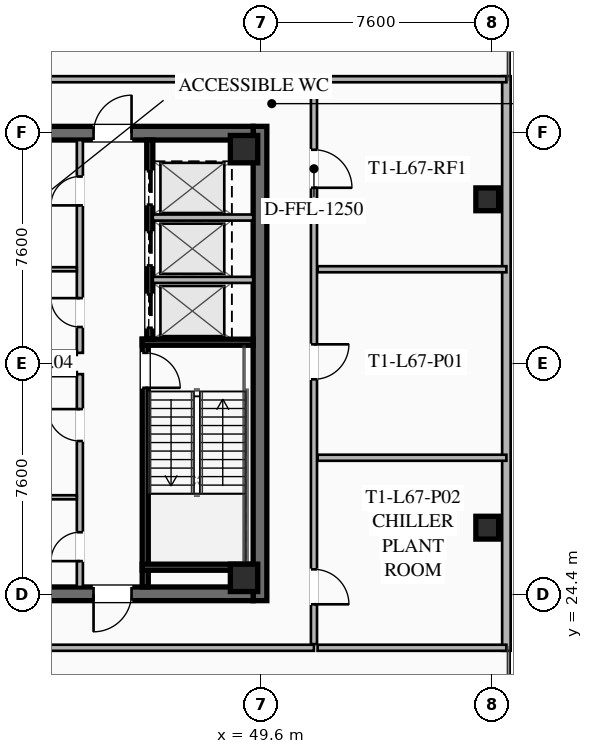
"""IFC4 building model, lengths in metres.
Left out: names, types, materials, properties, quantities, classifications, styles, units other than length and angle.
Written with IfcOpenShell. Run it as: python <this file> out.ifc"""

import sys

from ifc_helpers import new_model, si_unit, direction, frame, frame_2d, origin, origin_2d, place, context, subcontext, project, spatial, rectangle, hollow_rectangle, extrude, element, fill, save


model = new_model("IFC4")
c1 = context("Model", 3, precision=1e-05, world=origin(), true_north=direction((0.0, 1.0)))
c2 = subcontext(c1, "Body", "Model", "MODEL_VIEW")
j1 = project(units=[si_unit("LENGTHUNIT", "METRE"), si_unit("PLANEANGLEUNIT", "RADIAN")], contexts=[c1])
p1 = place(None, origin())
s1 = spatial("IfcSite", under=j1, at=p1, CompositionType="ELEMENT")
p2 = place(p1, origin())
s2 = spatial("IfcBuilding", under=s1, at=p2, CompositionType="ELEMENT")
p3 = place(p2, frame((0.0, 0.0, 246.8)))
s3 = spatial("IfcBuildingStorey", under=s2, at=p3, CompositionType="ELEMENT", Elevation=246.8)
p4 = place(p3, frame((49.575, 39.8, 0.0), z_axis=(0.0, 0.0, 1.0), x_axis=(0.0, -1.0, 0.0)))
e1 = element("IfcWall", 1, at=p4, inside=s3, PredefinedType="SHEAR", context=c2, shape_type="SweptSolid", body=[
    extrude(rectangle(XDim=15.6, YDim=0.45, at=frame_2d((7.8, 0.0))), origin(), (0.0, 0.0, 1.0), 4.6),
])
p5 = place(p3, frame((49.35, 24.425, 0.0), z_axis=(0.0, 0.0, 1.0), x_axis=(-1.0, 0.0, 0.0)))
e2 = element("IfcWall", 2, at=p5, inside=s3, PredefinedType="SHEAR", context=c2, shape_type="SweptSolid", body=[
    extrude(rectangle(XDim=14.7, YDim=0.45, at=frame_2d((7.35, 0.0))), origin(), (0.0, 0.0, 1.0), 4.6),
])
p6 = place(p5, frame((9.05, 0.0, 0.0)))
e3 = element("IfcOpeningElement", 3, at=p6, cuts=e2, PredefinedType="OPENING", context=c2, shape_type="SweptSolid", body=[
    extrude(rectangle(XDim=1.25, YDim=2.25, at=frame_2d((0.625, 1.125))), frame((0.0, 0.235, 0.0), z_axis=(0.0, -1.0, 0.0), x_axis=(1.0, 0.0, 0.0)), (0.0, 0.0, 1.0), 0.47),
])
p7 = place(p5, frame((4.0, 0.0, 0.0)))
e4 = element("IfcOpeningElement", 4, at=p7, cuts=e2, PredefinedType="OPENING", context=c2, shape_type="SweptSolid", body=[
    extrude(rectangle(XDim=1.25, YDim=2.25, at=frame_2d((0.625, 1.125))), frame((0.0, 0.235, 0.0), z_axis=(0.0, -1.0, 0.0), x_axis=(1.0, 0.0, 0.0)), (0.0, 0.0, 1.0), 0.47),
])
p8 = place(p3, frame((34.65, 39.575, 0.0), z_axis=(0.0, 0.0, 1.0), x_axis=(1.0, 0.0, 0.0)))
e5 = element("IfcWall", 5, at=p8, inside=s3, PredefinedType="SHEAR", context=c2, shape_type="SweptSolid", body=[
    extrude(rectangle(XDim=14.7, YDim=0.45, at=frame_2d((7.35, 0.0))), origin(), (0.0, 0.0, 1.0), 4.6),
])
p9 = place(p8, frame((4.4, 0.0, 0.0)))
e6 = element("IfcOpeningElement", 6, at=p9, cuts=e5, PredefinedType="OPENING", context=c2, shape_type="SweptSolid", body=[
    extrude(rectangle(XDim=1.25, YDim=2.25, at=frame_2d((0.625, 1.125))), frame((0.0, 0.235, 0.0), z_axis=(0.0, -1.0, 0.0), x_axis=(1.0, 0.0, 0.0)), (0.0, 0.0, 1.0), 0.47),
])
p10 = place(p8, frame((9.45, 0.0, 0.0)))
e7 = element("IfcOpeningElement", 7, at=p10, cuts=e5, PredefinedType="OPENING", context=c2, shape_type="SweptSolid", body=[
    extrude(rectangle(XDim=1.25, YDim=2.25, at=frame_2d((0.625, 1.125))), frame((0.0, 0.235, 0.0), z_axis=(0.0, -1.0, 0.0), x_axis=(1.0, 0.0, 0.0)), (0.0, 0.0, 1.0), 0.47),
])
for number, where, z_axis, x_axis in (
    (8, (49.05, 24.95, 0.0), (0.0, 0.0, 1.0), (1.0, 0.0, 0.0)),
    (9, (49.05, 39.05, 0.0), (0.0, 0.0, 1.0), (1.0, 0.0, 0.0)),
):
    element("IfcColumn", number, at=place(p3, frame(where, z_axis=z_axis, x_axis=x_axis)), inside=s3, PredefinedType="COLUMN", context=c2, shape_type="SweptSolid", body=[
        extrude(hollow_rectangle(XDim=0.9, YDim=0.9, WallThickness=0.04, at=origin_2d()), origin(), (0.0, 0.0, 1.0), 4.38),
    ])
for number, where, z_axis, x_axis in (
    (10, (57.05, 26.6, 0.0), (0.0, 0.0, 1.0), (1.0, 0.0, 0.0)),
    (11, (57.05, 37.4, 0.0), (0.0, 0.0, 1.0), (1.0, 0.0, 0.0)),
):
    element("IfcColumn", number, at=place(p3, frame(where, z_axis=z_axis, x_axis=x_axis)), inside=s3, PredefinedType="COLUMN", context=c2, shape_type="SweptSolid", body=[
        extrude(hollow_rectangle(XDim=0.75, YDim=0.75, WallThickness=0.032, at=origin_2d()), origin(), (0.0, 0.0, 1.0), 4.38),
    ])
p11 = place(p3, frame((57.68, 41.45, 0.0), z_axis=(0.0, 0.0, 1.0), x_axis=(0.0, -1.0, 0.0)))
e12 = element("IfcWall", 12, at=p11, inside=s3, PredefinedType="SOLIDWALL", context=c2, shape_type="SweptSolid", body=[
    extrude(rectangle(XDim=18.9, YDim=0.28, at=frame_2d((9.45, 0.0))), origin(), (0.0, 0.0, 1.0), 4.38),
])
p12 = place(p3, frame((45.8, 32.8, 0.0), z_axis=(0.0, 0.0, 1.0), x_axis=(0.0, -1.0, 0.0)))
e13 = element("IfcWall", 13, at=p12, inside=s3, PredefinedType="SHEAR", context=c2, shape_type="SweptSolid", body=[
    extrude(rectangle(XDim=8.15, YDim=0.2, at=frame_2d((4.075, 0.0))), origin(), (0.0, 0.0, 1.0), 4.38),
])
p13 = place(p12, frame((0.45, 0.0, 0.0)))
e14 = element("IfcOpeningElement", 14, at=p13, cuts=e13, PredefinedType="OPENING", context=c2, shape_type="SweptSolid", body=[
    extrude(rectangle(XDim=1.15, YDim=2.2, at=frame_2d((0.575, 1.1))), frame((0.0, 0.11, 0.0), z_axis=(0.0, -1.0, 0.0), x_axis=(1.0, 0.0, 0.0)), (0.0, 0.0, 1.0), 0.22),
])
for number, where, z_axis, x_axis in (
    (15, (45.7, 32.7, 0.0), (0.0, 0.0, 1.0), (1.0, 0.0, 0.0)),
    (16, (45.7, 25.3, 0.0), (0.0, 0.0, 1.0), (1.0, 0.0, 0.0)),
):
    element("IfcWall", number, at=place(p3, frame(where, z_axis=z_axis, x_axis=x_axis)), inside=s3, PredefinedType="SHEAR", context=c2, shape_type="SweptSolid", body=[
        extrude(rectangle(XDim=3.65, YDim=0.2, at=frame_2d((1.825, 0.0))), origin(), (0.0, 0.0, 1.0), 4.38),
    ])
p14 = place(p3, frame((45.95, 39.35, 0.0), z_axis=(0.0, 0.0, 1.0), x_axis=(0.0, -1.0, 0.0)))
e17 = element("IfcWall", 17, at=p14, inside=s3, PredefinedType="SHEAR", context=c2, shape_type="SweptSolid", body=[
    extrude(rectangle(XDim=6.55, YDim=0.2, at=frame_2d((3.275, 0.0))), origin(), (0.0, 0.0, 1.0), 4.38),
])
p15 = place(p14, frame((5.075, 0.0, 0.0)))
e18 = element("IfcOpeningElement", 18, at=p15, cuts=e17, PredefinedType="OPENING", context=c2, shape_type="SweptSolid", body=[
    extrude(rectangle(XDim=1.1, YDim=2.2, at=frame_2d((0.55, 1.1))), frame((0.0, 0.11, 0.0), z_axis=(0.0, -1.0, 0.0), x_axis=(1.0, 0.0, 0.0)), (0.0, 0.0, 1.0), 0.22),
])
p16 = place(p14, frame((3.025, 0.0, 0.0)))
e19 = element("IfcOpeningElement", 19, at=p16, cuts=e17, PredefinedType="OPENING", context=c2, shape_type="SweptSolid", body=[
    extrude(rectangle(XDim=1.1, YDim=2.2, at=frame_2d((0.55, 1.1))), frame((0.0, 0.11, 0.0), z_axis=(0.0, -1.0, 0.0), x_axis=(1.0, 0.0, 0.0)), (0.0, 0.0, 1.0), 0.22),
])
p17 = place(p14, frame((1.025, 0.0, 0.0)))
e20 = element("IfcOpeningElement", 20, at=p17, cuts=e17, PredefinedType="OPENING", context=c2, shape_type="SweptSolid", body=[
    extrude(rectangle(XDim=1.1, YDim=2.2, at=frame_2d((0.55, 1.1))), frame((0.0, 0.11, 0.0), z_axis=(0.0, -1.0, 0.0), x_axis=(1.0, 0.0, 0.0)), (0.0, 0.0, 1.0), 0.22),
])
for number, where, z_axis, x_axis in (
    (21, (46.05, 34.75, 0.0), (0.0, 0.0, 1.0), (1.0, 0.0, 0.0)),
    (22, (46.05, 36.8, 0.0), (0.0, 0.0, 1.0), (1.0, 0.0, 0.0)),
):
    element("IfcWall", number, at=place(p3, frame(where, z_axis=z_axis, x_axis=x_axis)), inside=s3, PredefinedType="SOLIDWALL", context=c2, shape_type="SweptSolid", body=[
        extrude(rectangle(XDim=3.3, YDim=0.2, at=frame_2d((1.65, 0.0))), origin(), (0.0, 0.0, 1.0), 4.38),
    ])
p18 = place(p3, frame((43.65, 24.65, 0.0), z_axis=(0.0, 0.0, 1.0), x_axis=(0.0, 1.0, 0.0)))
e23 = element("IfcWall", 23, at=p18, inside=s3, PredefinedType="SOLIDWALL", context=c2, shape_type="SweptSolid", body=[
    extrude(rectangle(XDim=7.0, YDim=0.2, at=frame_2d((3.5, 0.0))), origin(), (0.0, 0.0, 1.0), 3.491),
])
p19 = place(p18, frame((0.85, 0.0, 0.0)))
e24 = element("IfcOpeningElement", 24, at=p19, cuts=e23, PredefinedType="OPENING", context=c2, shape_type="SweptSolid", body=[
    extrude(rectangle(XDim=0.95, YDim=2.05, at=frame_2d((0.475, 1.025))), frame((0.0, 0.11, 0.0), z_axis=(0.0, -1.0, 0.0), x_axis=(1.0, 0.0, 0.0)), (0.0, 0.0, 1.0), 0.22),
])
p20 = place(p18, frame((4.8, 0.0, 0.0)))
e25 = element("IfcOpeningElement", 25, at=p20, cuts=e23, PredefinedType="OPENING", context=c2, shape_type="SweptSolid", body=[
    extrude(rectangle(XDim=1.05, YDim=2.2, at=frame_2d((0.525, 1.1))), frame((0.0, 0.11, 0.0), z_axis=(0.0, -1.0, 0.0), x_axis=(1.0, 0.0, 0.0)), (0.0, 0.0, 1.0), 0.22),
])
for number, where, z_axis, x_axis in (
    (26, (41.67, 31.65, 0.0), (0.0, 0.0, 1.0), (1.0, 0.0, 0.0)),
    (27, (41.67, 27.6, 0.0), (0.0, 0.0, 1.0), (1.0, 0.0, 0.0)),
):
    element("IfcWall", number, at=place(p3, frame(where, z_axis=z_axis, x_axis=x_axis)), inside=s3, PredefinedType="PARTITIONING", context=c2, shape_type="SweptSolid", body=[
        extrude(rectangle(XDim=1.88, YDim=0.135, at=frame_2d((0.94, 0.0))), origin(), (0.0, 0.0, 1.0), 3.491),
    ])
p21 = place(p3, frame((43.65, 32.35, 0.0), z_axis=(0.0, 0.0, 1.0), x_axis=(0.0, 1.0, 0.0)))
e28 = element("IfcWall", 28, at=p21, inside=s3, PredefinedType="SOLIDWALL", context=c2, shape_type="SweptSolid", body=[
    extrude(rectangle(XDim=7.0, YDim=0.2, at=frame_2d((3.5, 0.0))), origin(), (0.0, 0.0, 1.0), 3.491),
])
p22 = place(p21, frame((0.85, 0.0, 0.0)))
e29 = element("IfcOpeningElement", 29, at=p22, cuts=e28, PredefinedType="OPENING", context=c2, shape_type="SweptSolid", body=[
    extrude(rectangle(XDim=0.95, YDim=2.05, at=frame_2d((0.475, 1.025))), frame((0.0, 0.11, 0.0), z_axis=(0.0, -1.0, 0.0), x_axis=(1.0, 0.0, 0.0)), (0.0, 0.0, 1.0), 0.22),
])
p23 = place(p21, frame((4.85, 0.0, 0.0)))
e30 = element("IfcOpeningElement", 30, at=p23, cuts=e28, PredefinedType="OPENING", context=c2, shape_type="SweptSolid", body=[
    extrude(rectangle(XDim=0.95, YDim=2.05, at=frame_2d((0.475, 1.025))), frame((0.0, 0.11, 0.0), z_axis=(0.0, -1.0, 0.0), x_axis=(1.0, 0.0, 0.0)), (0.0, 0.0, 1.0), 0.22),
])
for number, where, z_axis, x_axis in (
    (31, (41.67, 32.35, 0.0), (0.0, 0.0, 1.0), (1.0, 0.0, 0.0)),
    (32, (41.67, 35.1, 0.0), (0.0, 0.0, 1.0), (1.0, 0.0, 0.0)),
):
    element("IfcWall", number, at=place(p3, frame(where, z_axis=z_axis, x_axis=x_axis)), inside=s3, PredefinedType="PARTITIONING", context=c2, shape_type="SweptSolid", body=[
        extrude(rectangle(XDim=1.88, YDim=0.135, at=frame_2d((0.94, 0.0))), origin(), (0.0, 0.0, 1.0), 3.491),
    ])
for number, where, z_axis, x_axis in (
    (33, (32.65, 41.35, 0.0), (0.0, 0.0, 1.0), (1.0, 0.0, 0.0)),
    (34, (51.35, 22.65, 0.0), (0.0, 0.0, 1.0), (-1.0, 0.0, 0.0)),
):
    element("IfcWall", number, at=place(p3, frame(where, z_axis=z_axis, x_axis=x_axis)), inside=s3, PredefinedType="SOLIDWALL", context=c2, shape_type="SweptSolid", body=[
        extrude(rectangle(XDim=18.7, YDim=0.2, at=frame_2d((9.35, 0.0))), origin(), (0.0, 0.0, 1.0), 3.491),
    ])
p24 = place(p3, frame((51.35, 41.23, 0.0), z_axis=(0.0, 0.0, 1.0), x_axis=(0.0, -1.0, 0.0)))
e35 = element("IfcWall", 35, at=p24, inside=s3, PredefinedType="SOLIDWALL", context=c2, shape_type="SweptSolid", body=[
    extrude(rectangle(XDim=18.46, YDim=0.2, at=frame_2d((9.23, 0.0))), origin(), (0.0, 0.0, 1.0), 3.491),
])
p25 = place(p24, frame((2.2, 0.0, 0.0)))
e36 = element("IfcOpeningElement", 36, at=p25, cuts=e35, PredefinedType="OPENING", context=c2, shape_type="SweptSolid", body=[
    extrude(rectangle(XDim=1.25, YDim=2.25, at=frame_2d((0.625, 1.125))), frame((0.0, 0.11, 0.0), z_axis=(0.0, -1.0, 0.0), x_axis=(1.0, 0.0, 0.0)), (0.0, 0.0, 1.0), 0.22),
])
p26 = place(p24, frame((8.6, 0.0, 0.0)))
e37 = element("IfcOpeningElement", 37, at=p26, cuts=e35, PredefinedType="OPENING", context=c2, shape_type="SweptSolid", body=[
    extrude(rectangle(XDim=1.15, YDim=2.2, at=frame_2d((0.575, 1.1))), frame((0.0, 0.11, 0.0), z_axis=(0.0, -1.0, 0.0), x_axis=(1.0, 0.0, 0.0)), (0.0, 0.0, 1.0), 0.22),
])
p27 = place(p24, frame((16.0, 0.0, 0.0)))
e38 = element("IfcOpeningElement", 38, at=p27, cuts=e35, PredefinedType="OPENING", context=c2, shape_type="SweptSolid", body=[
    extrude(rectangle(XDim=1.15, YDim=2.2, at=frame_2d((0.575, 1.1))), frame((0.0, 0.11, 0.0), z_axis=(0.0, -1.0, 0.0), x_axis=(1.0, 0.0, 0.0)), (0.0, 0.0, 1.0), 0.22),
])
for number, where, z_axis, x_axis in (
    (39, (51.47, 41.35, 0.0), (0.0, 0.0, 1.0), (1.0, 0.0, 0.0)),
    (40, (51.47, 22.65, 0.0), (0.0, 0.0, 1.0), (1.0, 0.0, 0.0)),
    (41, (51.47, 35.1, 0.0), (0.0, 0.0, 1.0), (1.0, 0.0, 0.0)),
    (42, (51.47, 28.9, 0.0), (0.0, 0.0, 1.0), (1.0, 0.0, 0.0)),
):
    element("IfcWall", number, at=place(p3, frame(where, z_axis=z_axis, x_axis=x_axis)), inside=s3, PredefinedType="SOLIDWALL", context=c2, shape_type="SweptSolid", body=[
        extrude(rectangle(XDim=6.21, YDim=0.2, at=frame_2d((3.105, 0.0))), origin(), (0.0, 0.0, 1.0), 3.491),
    ])
p28 = place(p10, origin())
e43 = element("IfcDoor", 43, at=p28, inside=s3, OperationType="SINGLE_SWING_RIGHT", PredefinedType="DOOR", context=c2, shape_type="SweptSolid", body=[
    extrude(rectangle(XDim=1.25, YDim=2.25, at=frame_2d((0.625, 1.125))), frame((0.0, 0.025, 0.0), z_axis=(0.0, -1.0, 0.0), x_axis=(1.0, 0.0, 0.0)), (0.0, 0.0, 1.0), 0.05),
])
fill(e7, e43)
p29 = place(p7, origin())
e44 = element("IfcDoor", 44, at=p29, inside=s3, OperationType="SINGLE_SWING_RIGHT", PredefinedType="DOOR", context=c2, shape_type="SweptSolid", body=[
    extrude(rectangle(XDim=1.25, YDim=2.25, at=frame_2d((0.625, 1.125))), frame((0.0, 0.025, 0.0), z_axis=(0.0, -1.0, 0.0), x_axis=(1.0, 0.0, 0.0)), (0.0, 0.0, 1.0), 0.05),
])
fill(e4, e44)
p30 = place(p13, origin())
e45 = element("IfcDoor", 45, at=p30, inside=s3, OperationType="SINGLE_SWING_RIGHT", PredefinedType="DOOR", context=c2, shape_type="SweptSolid", body=[
    extrude(rectangle(XDim=1.15, YDim=2.2, at=frame_2d((0.575, 1.1))), frame((0.0, 0.025, 0.0), z_axis=(0.0, -1.0, 0.0), x_axis=(1.0, 0.0, 0.0)), (0.0, 0.0, 1.0), 0.05),
])
fill(e14, e45)
p31 = place(p19, origin())
e46 = element("IfcDoor", 46, at=p31, inside=s3, OperationType="SINGLE_SWING_LEFT", PredefinedType="DOOR", context=c2, shape_type="SweptSolid", body=[
    extrude(rectangle(XDim=0.95, YDim=2.05, at=frame_2d((0.475, 1.025))), frame((0.0, 0.025, 0.0), z_axis=(0.0, -1.0, 0.0), x_axis=(1.0, 0.0, 0.0)), (0.0, 0.0, 1.0), 0.05),
])
fill(e24, e46)
p32 = place(p20, origin())
e47 = element("IfcDoor", 47, at=p32, inside=s3, OperationType="SINGLE_SWING_RIGHT", PredefinedType="DOOR", context=c2, shape_type="SweptSolid", body=[
    extrude(rectangle(XDim=1.05, YDim=2.2, at=frame_2d((0.525, 1.1))), frame((0.0, 0.025, 0.0), z_axis=(0.0, -1.0, 0.0), x_axis=(1.0, 0.0, 0.0)), (0.0, 0.0, 1.0), 0.05),
])
fill(e25, e47)
p33 = place(p22, origin())
e48 = element("IfcDoor", 48, at=p33, inside=s3, OperationType="SINGLE_SWING_RIGHT", PredefinedType="DOOR", context=c2, shape_type="SweptSolid", body=[
    extrude(rectangle(XDim=0.95, YDim=2.05, at=frame_2d((0.475, 1.025))), frame((0.0, 0.025, 0.0), z_axis=(0.0, -1.0, 0.0), x_axis=(1.0, 0.0, 0.0)), (0.0, 0.0, 1.0), 0.05),
])
fill(e29, e48)
p34 = place(p23, origin())
e49 = element("IfcDoor", 49, at=p34, inside=s3, OperationType="SINGLE_SWING_LEFT", PredefinedType="DOOR", context=c2, shape_type="SweptSolid", body=[
    extrude(rectangle(XDim=0.95, YDim=2.05, at=frame_2d((0.475, 1.025))), frame((0.0, 0.025, 0.0), z_axis=(0.0, -1.0, 0.0), x_axis=(1.0, 0.0, 0.0)), (0.0, 0.0, 1.0), 0.05),
])
fill(e30, e49)
p35 = place(p25, origin())
e50 = element("IfcDoor", 50, at=p35, inside=s3, OperationType="SINGLE_SWING_RIGHT", PredefinedType="DOOR", context=c2, shape_type="SweptSolid", body=[
    extrude(rectangle(XDim=1.25, YDim=2.25, at=frame_2d((0.625, 1.125))), frame((0.0, 0.025, 0.0), z_axis=(0.0, -1.0, 0.0), x_axis=(1.0, 0.0, 0.0)), (0.0, 0.0, 1.0), 0.05),
])
fill(e36, e50)
p36 = place(p26, origin())
e51 = element("IfcDoor", 51, at=p36, inside=s3, OperationType="SINGLE_SWING_LEFT", PredefinedType="DOOR", context=c2, shape_type="SweptSolid", body=[
    extrude(rectangle(XDim=1.15, YDim=2.2, at=frame_2d((0.575, 1.1))), frame((0.0, 0.025, 0.0), z_axis=(0.0, -1.0, 0.0), x_axis=(1.0, 0.0, 0.0)), (0.0, 0.0, 1.0), 0.05),
])
fill(e37, e51)
p37 = place(p27, origin())
e52 = element("IfcDoor", 52, at=p37, inside=s3, OperationType="SINGLE_SWING_RIGHT", PredefinedType="DOOR", context=c2, shape_type="SweptSolid", body=[
    extrude(rectangle(XDim=1.15, YDim=2.2, at=frame_2d((0.575, 1.1))), frame((0.0, 0.025, 0.0), z_axis=(0.0, -1.0, 0.0), x_axis=(1.0, 0.0, 0.0)), (0.0, 0.0, 1.0), 0.05),
])
fill(e38, e52)
p38 = place(p15, origin())
e53 = element("IfcDoor", 53, at=p38, inside=s3, OperationType="SLIDING_TO_LEFT", PredefinedType="DOOR", context=c2, shape_type="SweptSolid", body=[
    extrude(rectangle(XDim=1.1, YDim=2.2, at=frame_2d((0.55, 1.1))), frame((0.0, 0.025, 0.0), z_axis=(0.0, -1.0, 0.0), x_axis=(1.0, 0.0, 0.0)), (0.0, 0.0, 1.0), 0.05),
])
fill(e18, e53)
p39 = place(p16, origin())
e54 = element("IfcDoor", 54, at=p39, inside=s3, OperationType="SLIDING_TO_LEFT", PredefinedType="DOOR", context=c2, shape_type="SweptSolid", body=[
    extrude(rectangle(XDim=1.1, YDim=2.2, at=frame_2d((0.55, 1.1))), frame((0.0, 0.025, 0.0), z_axis=(0.0, -1.0, 0.0), x_axis=(1.0, 0.0, 0.0)), (0.0, 0.0, 1.0), 0.05),
])
fill(e19, e54)
p40 = place(p17, origin())
e55 = element("IfcDoor", 55, at=p40, inside=s3, OperationType="SLIDING_TO_LEFT", PredefinedType="DOOR", context=c2, shape_type="SweptSolid", body=[
    extrude(rectangle(XDim=1.1, YDim=2.2, at=frame_2d((0.55, 1.1))), frame((0.0, 0.025, 0.0), z_axis=(0.0, -1.0, 0.0), x_axis=(1.0, 0.0, 0.0)), (0.0, 0.0, 1.0), 0.05),
])
fill(e20, e55)
save(model, sys.argv[1])
